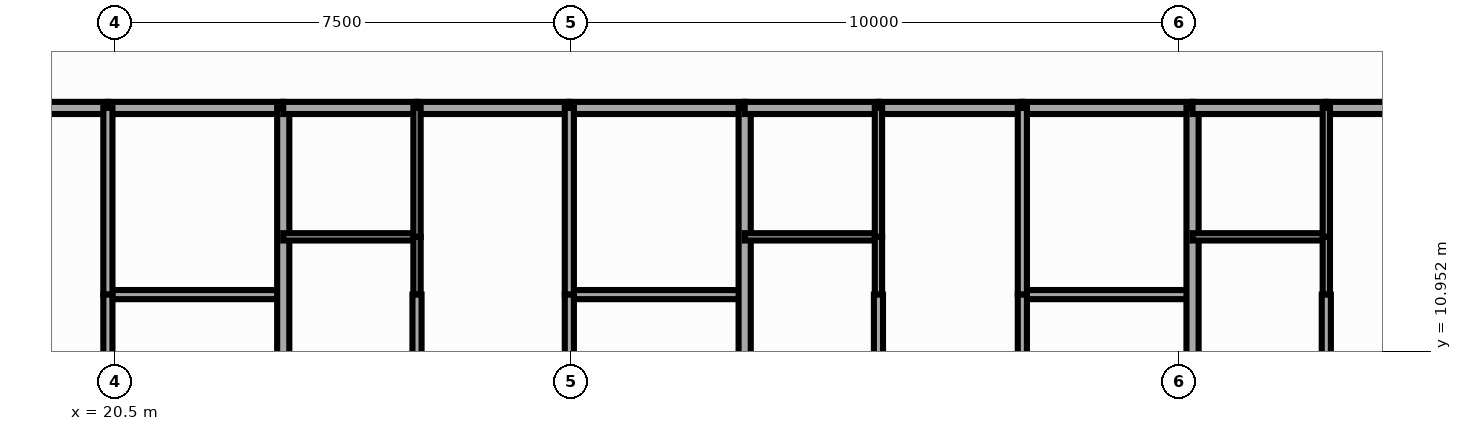
"""IFC4 building model, lengths in metres.
Left out: names, types, materials, properties, quantities, classifications, styles, units other than length and angle.
Written with IfcOpenShell. Run it as: python <this file> out.ifc"""

import sys

from ifc_helpers import new_model, si_unit, direction, frame, frame_2d, origin, place, context, subcontext, project, spatial, rectangle, extrude, source, transform, mapped, element, fill, save


model = new_model("IFC4")
c1 = context("Model", 3, precision=1e-05, world=origin(), true_north=direction((0.0, 1.0)))
c2 = subcontext(c1, "Body", "Model", "MODEL_VIEW")
j1 = project(units=[si_unit("LENGTHUNIT", "METRE"), si_unit("PLANEANGLEUNIT", "RADIAN")], contexts=[c1])
p1 = place(None, origin())
s1 = spatial("IfcSite", under=j1, at=p1, CompositionType="ELEMENT")
p2 = place(p1, origin())
s2 = spatial("IfcBuilding", under=s1, at=p2, CompositionType="ELEMENT")
p3 = place(p2, frame((0.0, 0.0, 19.4)))
s3 = spatial("IfcBuildingStorey", under=s2, at=p3, CompositionType="ELEMENT", Elevation=19.4)
p4 = place(p3, frame((17.88, 14.95, 0.0), z_axis=(0.0, 0.0, 1.0), x_axis=(1.0, 0.0, 0.0)))
e1 = element("IfcWall", 1, at=p4, inside=s3, PredefinedType="PARTITIONING", context=c2, shape_type="SweptSolid", body=[
    extrude(rectangle(XDim=2.505, YDim=0.2, at=frame_2d((1.252, 0.0))), origin(), (0.0, 0.0, 1.0), 2.79),
])
p5 = place(p4, frame((0.753, 0.0, 0.0)))
e2 = element("IfcOpeningElement", 2, at=p5, cuts=e1, PredefinedType="OPENING", context=c2, shape_type="SweptSolid", body=[
    extrude(rectangle(XDim=1.0, YDim=2.15, at=frame_2d((0.5, 1.075))), frame((0.0, 0.112, 0.0), z_axis=(0.0, -1.0, 0.0), x_axis=(1.0, 0.0, 0.0)), (0.0, 0.0, 1.0), 0.224),
])
p6 = place(p3, frame((20.385, 14.95, 0.0), z_axis=(0.0, 0.0, 1.0), x_axis=(1.0, 0.0, 0.0)))
e3 = element("IfcWall", 3, at=p6, inside=s3, PredefinedType="PARTITIONING", context=c2, shape_type="SweptSolid", body=[
    extrude(rectangle(XDim=2.884, YDim=0.2, at=frame_2d((1.442, 0.0))), origin(), (0.0, 0.0, 1.0), 2.79),
])
p7 = place(p3, frame((20.385, 11.88, 0.0), z_axis=(0.0, 0.0, 1.0), x_axis=(1.0, 0.0, 0.0)))
e4 = element("IfcWall", 4, at=p7, inside=s3, PredefinedType="PARTITIONING", context=c2, shape_type="SweptSolid", body=[
    extrude(rectangle(XDim=2.884, YDim=0.15, at=frame_2d((1.442, 0.0))), origin(), (0.0, 0.0, 1.0), 2.79),
])
p8 = place(p3, frame((20.385, 14.95, 0.0), z_axis=(0.0, 0.0, 1.0), x_axis=(0.0, -1.0, 0.0)))
e5 = element("IfcWall", 5, at=p8, inside=s3, PredefinedType="PARTITIONING", context=c2, shape_type="SweptSolid", body=[
    extrude(rectangle(XDim=3.07, YDim=0.15, at=frame_2d((1.535, 0.0))), origin(), (0.0, 0.0, 1.0), 2.79),
])
p9 = place(p8, frame((1.085, 0.0, 0.0)))
e6 = element("IfcOpeningElement", 6, at=p9, cuts=e5, PredefinedType="OPENING", context=c2, shape_type="SweptSolid", body=[
    extrude(rectangle(XDim=0.9, YDim=2.1, at=frame_2d((0.45, 1.05))), frame((0.0, 0.087, 0.0), z_axis=(0.0, -1.0, 0.0), x_axis=(1.0, 0.0, 0.0)), (0.0, 0.0, 1.0), 0.174),
])
p10 = place(p3, frame((20.385, 11.88, 0.0), z_axis=(0.0, 0.0, 1.0), x_axis=(0.0, -1.0, 0.0)))
e7 = element("IfcWall", 7, at=p10, inside=s3, PredefinedType="PARTITIONING", context=c2, shape_type="SweptSolid", body=[
    extrude(rectangle(XDim=8.73, YDim=0.15, at=frame_2d((4.365, 0.0))), origin(), (0.0, 0.0, 1.0), 2.79),
])
p11 = place(p10, frame((3.609, 0.0, 0.0)))
e8 = element("IfcOpeningElement", 8, at=p11, cuts=e7, PredefinedType="OPENING", context=c2, shape_type="SweptSolid", body=[
    extrude(rectangle(XDim=0.9, YDim=2.1, at=frame_2d((0.45, 1.05))), frame((0.0, 0.087, 0.0), z_axis=(0.0, -1.0, 0.0), x_axis=(1.0, 0.0, 0.0)), (0.0, 0.0, 1.0), 0.174),
])
p12 = place(p3, frame((23.269, 14.95, 0.0), z_axis=(0.0, 0.0, 1.0), x_axis=(0.0, -1.0, 0.0)))
e9 = element("IfcWall", 9, at=p12, inside=s3, PredefinedType="PARTITIONING", context=c2, shape_type="SweptSolid", body=[
    extrude(rectangle(XDim=11.8, YDim=0.2, at=frame_2d((5.9, 0.0))), origin(), (0.0, 0.0, 1.0), 2.79),
])
p13 = place(p3, frame((23.269, 14.95, 0.0), z_axis=(0.0, 0.0, 1.0), x_axis=(1.0, 0.0, 0.0)))
e10 = element("IfcWall", 10, at=p13, inside=s3, PredefinedType="PARTITIONING", context=c2, shape_type="SweptSolid", body=[
    extrude(rectangle(XDim=2.2, YDim=0.2, at=frame_2d((1.1, 0.0))), origin(), (0.0, 0.0, 1.0), 2.79),
])
p14 = place(p3, frame((25.469, 14.95, 0.0), z_axis=(0.0, 0.0, 1.0), x_axis=(1.0, 0.0, 0.0)))
e11 = element("IfcWall", 11, at=p14, inside=s3, PredefinedType="PARTITIONING", context=c2, shape_type="SweptSolid", body=[
    extrude(rectangle(XDim=2.505, YDim=0.2, at=frame_2d((1.252, 0.0))), origin(), (0.0, 0.0, 1.0), 2.79),
])
p15 = place(p14, frame((0.752, 0.0, 0.0)))
e12 = element("IfcOpeningElement", 12, at=p15, cuts=e11, PredefinedType="OPENING", context=c2, shape_type="SweptSolid", body=[
    extrude(rectangle(XDim=1.0, YDim=2.15, at=frame_2d((0.5, 1.075))), frame((0.0, 0.112, 0.0), z_axis=(0.0, -1.0, 0.0), x_axis=(1.0, 0.0, 0.0)), (0.0, 0.0, 1.0), 0.224),
])
p16 = place(p3, frame((27.974, 14.95, 0.0), z_axis=(0.0, 0.0, 1.0), x_axis=(1.0, 0.0, 0.0)))
e13 = element("IfcWall", 13, at=p16, inside=s3, PredefinedType="PARTITIONING", context=c2, shape_type="SweptSolid", body=[
    extrude(rectangle(XDim=2.884, YDim=0.2, at=frame_2d((1.442, 0.0))), origin(), (0.0, 0.0, 1.0), 2.79),
])
p17 = place(p3, frame((23.269, 12.83, 0.0), z_axis=(0.0, 0.0, 1.0), x_axis=(1.0, 0.0, 0.0)))
e14 = element("IfcWall", 14, at=p17, inside=s3, PredefinedType="PARTITIONING", context=c2, shape_type="SweptSolid", body=[
    extrude(rectangle(XDim=2.2, YDim=0.12, at=frame_2d((1.1, 0.0))), origin(), (0.0, 0.0, 1.0), 2.79),
])
p18 = place(p3, frame((27.974, 11.88, 0.0), z_axis=(0.0, 0.0, 1.0), x_axis=(1.0, 0.0, 0.0)))
e15 = element("IfcWall", 15, at=p18, inside=s3, PredefinedType="PARTITIONING", context=c2, shape_type="SweptSolid", body=[
    extrude(rectangle(XDim=2.884, YDim=0.15, at=frame_2d((1.442, 0.0))), origin(), (0.0, 0.0, 1.0), 2.79),
])
p19 = place(p3, frame((25.469, 14.95, 0.0), z_axis=(0.0, 0.0, 1.0), x_axis=(0.0, -1.0, 0.0)))
e16 = element("IfcWall", 16, at=p19, inside=s3, PredefinedType="PARTITIONING", context=c2, shape_type="SweptSolid", body=[
    extrude(rectangle(XDim=2.12, YDim=0.12, at=frame_2d((1.06, 0.0))), origin(), (0.0, 0.0, 1.0), 2.79),
])
p20 = place(p19, frame((0.635, 0.0, 0.0)))
e17 = element("IfcOpeningElement", 17, at=p20, cuts=e16, PredefinedType="OPENING", context=c2, shape_type="SweptSolid", body=[
    extrude(rectangle(XDim=0.85, YDim=2.05, at=frame_2d((0.425, 1.025))), frame((0.0, 0.072, 0.0), z_axis=(0.0, -1.0, 0.0), x_axis=(1.0, 0.0, 0.0)), (0.0, 0.0, 1.0), 0.144),
])
p21 = place(p3, frame((25.469, 12.83, 0.0), z_axis=(0.0, 0.0, 1.0), x_axis=(0.0, -1.0, 0.0)))
e18 = element("IfcWall", 18, at=p21, inside=s3, PredefinedType="PARTITIONING", context=c2, shape_type="SweptSolid", body=[
    extrude(rectangle(XDim=0.95, YDim=0.12, at=frame_2d((0.475, 0.0))), origin(), (0.0, 0.0, 1.0), 2.79),
])
p22 = place(p3, frame((25.469, 11.88, 0.0), z_axis=(0.0, 0.0, 1.0), x_axis=(0.0, -1.0, 0.0)))
e19 = element("IfcWall", 19, at=p22, inside=s3, PredefinedType="PARTITIONING", context=c2, shape_type="SweptSolid", body=[
    extrude(rectangle(XDim=8.73, YDim=0.15, at=frame_2d((4.365, 0.0))), origin(), (0.0, 0.0, 1.0), 2.79),
])
p23 = place(p22, frame((3.609, 0.0, 0.0)))
e20 = element("IfcOpeningElement", 20, at=p23, cuts=e19, PredefinedType="OPENING", context=c2, shape_type="SweptSolid", body=[
    extrude(rectangle(XDim=0.9, YDim=2.1, at=frame_2d((0.45, 1.05))), frame((0.0, 0.087, 0.0), z_axis=(0.0, -1.0, 0.0), x_axis=(1.0, 0.0, 0.0)), (0.0, 0.0, 1.0), 0.174),
])
p24 = place(p3, frame((27.974, 14.95, 0.0), z_axis=(0.0, 0.0, 1.0), x_axis=(0.0, -1.0, 0.0)))
e21 = element("IfcWall", 21, at=p24, inside=s3, PredefinedType="PARTITIONING", context=c2, shape_type="SweptSolid", body=[
    extrude(rectangle(XDim=3.07, YDim=0.15, at=frame_2d((1.535, 0.0))), origin(), (0.0, 0.0, 1.0), 2.79),
])
p25 = place(p24, frame((1.085, 0.0, 0.0)))
e22 = element("IfcOpeningElement", 22, at=p25, cuts=e21, PredefinedType="OPENING", context=c2, shape_type="SweptSolid", body=[
    extrude(rectangle(XDim=0.9, YDim=2.1, at=frame_2d((0.45, 1.05))), frame((0.0, 0.087, 0.0), z_axis=(0.0, -1.0, 0.0), x_axis=(1.0, 0.0, 0.0)), (0.0, 0.0, 1.0), 0.174),
])
p26 = place(p3, frame((27.974, 11.88, 0.0), z_axis=(0.0, 0.0, 1.0), x_axis=(0.0, -1.0, 0.0)))
e23 = element("IfcWall", 23, at=p26, inside=s3, PredefinedType="PARTITIONING", context=c2, shape_type="SweptSolid", body=[
    extrude(rectangle(XDim=8.73, YDim=0.15, at=frame_2d((4.365, 0.0))), origin(), (0.0, 0.0, 1.0), 2.79),
])
p27 = place(p26, frame((3.609, 0.0, 0.0)))
e24 = element("IfcOpeningElement", 24, at=p27, cuts=e23, PredefinedType="OPENING", context=c2, shape_type="SweptSolid", body=[
    extrude(rectangle(XDim=0.9, YDim=2.1, at=frame_2d((0.45, 1.05))), frame((0.0, 0.087, 0.0), z_axis=(0.0, -1.0, 0.0), x_axis=(1.0, 0.0, 0.0)), (0.0, 0.0, 1.0), 0.174),
])
p28 = place(p3, frame((30.858, 14.95, 0.0), z_axis=(0.0, 0.0, 1.0), x_axis=(0.0, -1.0, 0.0)))
e25 = element("IfcWall", 25, at=p28, inside=s3, PredefinedType="PARTITIONING", context=c2, shape_type="SweptSolid", body=[
    extrude(rectangle(XDim=11.8, YDim=0.2, at=frame_2d((5.9, 0.0))), origin(), (0.0, 0.0, 1.0), 2.24),
])
p29 = place(p3, frame((30.858, 14.95, 0.0), z_axis=(0.0, 0.0, 1.0), x_axis=(1.0, 0.0, 0.0)))
e26 = element("IfcWall", 26, at=p29, inside=s3, PredefinedType="PARTITIONING", context=c2, shape_type="SweptSolid", body=[
    extrude(rectangle(XDim=2.2, YDim=0.2, at=frame_2d((1.1, 0.0))), origin(), (0.0, 0.0, 1.0), 2.79),
])
p30 = place(p3, frame((33.058, 14.95, 0.0), z_axis=(0.0, 0.0, 1.0), x_axis=(1.0, 0.0, 0.0)))
e27 = element("IfcWall", 27, at=p30, inside=s3, PredefinedType="PARTITIONING", context=c2, shape_type="SweptSolid", body=[
    extrude(rectangle(XDim=2.367, YDim=0.2, at=frame_2d((1.183, 0.0))), origin(), (0.0, 0.0, 1.0), 2.79),
])
p31 = place(p30, frame((0.683, 0.0, 0.0)))
e28 = element("IfcOpeningElement", 28, at=p31, cuts=e27, PredefinedType="OPENING", context=c2, shape_type="SweptSolid", body=[
    extrude(rectangle(XDim=1.0, YDim=2.15, at=frame_2d((0.5, 1.075))), frame((0.0, 0.112, 0.0), z_axis=(0.0, -1.0, 0.0), x_axis=(1.0, 0.0, 0.0)), (0.0, 0.0, 1.0), 0.224),
])
p32 = place(p3, frame((35.424, 14.95, 0.0), z_axis=(0.0, 0.0, 1.0), x_axis=(1.0, 0.0, 0.0)))
e29 = element("IfcWall", 29, at=p32, inside=s3, PredefinedType="PARTITIONING", context=c2, shape_type="SweptSolid", body=[
    extrude(rectangle(XDim=2.799, YDim=0.2, at=frame_2d((1.399, 0.0))), origin(), (0.0, 0.0, 1.0), 2.79),
])
p33 = place(p3, frame((30.858, 12.83, 0.0), z_axis=(0.0, 0.0, 1.0), x_axis=(1.0, 0.0, 0.0)))
e30 = element("IfcWall", 30, at=p33, inside=s3, PredefinedType="PARTITIONING", context=c2, shape_type="SweptSolid", body=[
    extrude(rectangle(XDim=2.2, YDim=0.12, at=frame_2d((1.1, 0.0))), origin(), (0.0, 0.0, 1.0), 2.79),
])
p34 = place(p3, frame((35.424, 11.88, 0.0), z_axis=(0.0, 0.0, 1.0), x_axis=(1.0, 0.0, 0.0)))
e31 = element("IfcWall", 31, at=p34, inside=s3, PredefinedType="PARTITIONING", context=c2, shape_type="SweptSolid", body=[
    extrude(rectangle(XDim=2.799, YDim=0.15, at=frame_2d((1.399, 0.0))), origin(), (0.0, 0.0, 1.0), 2.79),
])
p35 = place(p3, frame((33.058, 14.95, 0.0), z_axis=(0.0, 0.0, 1.0), x_axis=(0.0, -1.0, 0.0)))
e32 = element("IfcWall", 32, at=p35, inside=s3, PredefinedType="PARTITIONING", context=c2, shape_type="SweptSolid", body=[
    extrude(rectangle(XDim=2.12, YDim=0.12, at=frame_2d((1.06, 0.0))), origin(), (0.0, 0.0, 1.0), 2.79),
])
p36 = place(p35, frame((0.635, 0.0, 0.0)))
e33 = element("IfcOpeningElement", 33, at=p36, cuts=e32, PredefinedType="OPENING", context=c2, shape_type="SweptSolid", body=[
    extrude(rectangle(XDim=0.85, YDim=2.05, at=frame_2d((0.425, 1.025))), frame((0.0, 0.072, 0.0), z_axis=(0.0, -1.0, 0.0), x_axis=(1.0, 0.0, 0.0)), (0.0, 0.0, 1.0), 0.144),
])
p37 = place(p3, frame((33.058, 12.83, 0.0), z_axis=(0.0, 0.0, 1.0), x_axis=(0.0, -1.0, 0.0)))
e34 = element("IfcWall", 34, at=p37, inside=s3, PredefinedType="PARTITIONING", context=c2, shape_type="SweptSolid", body=[
    extrude(rectangle(XDim=0.95, YDim=0.12, at=frame_2d((0.475, 0.0))), origin(), (0.0, 0.0, 1.0), 2.79),
])
p38 = place(p3, frame((33.058, 11.88, 0.0), z_axis=(0.0, 0.0, 1.0), x_axis=(0.0, -1.0, 0.0)))
e35 = element("IfcWall", 35, at=p38, inside=s3, PredefinedType="PARTITIONING", context=c2, shape_type="SweptSolid", body=[
    extrude(rectangle(XDim=8.73, YDim=0.15, at=frame_2d((4.365, 0.0))), origin(), (0.0, 0.0, 1.0), 2.79),
])
p39 = place(p38, frame((3.609, 0.0, 0.0)))
e36 = element("IfcOpeningElement", 36, at=p39, cuts=e35, PredefinedType="OPENING", context=c2, shape_type="SweptSolid", body=[
    extrude(rectangle(XDim=0.9, YDim=2.1, at=frame_2d((0.45, 1.05))), frame((0.0, 0.087, 0.0), z_axis=(0.0, -1.0, 0.0), x_axis=(1.0, 0.0, 0.0)), (0.0, 0.0, 1.0), 0.174),
])
p40 = place(p3, frame((35.424, 14.95, 0.0), z_axis=(0.0, 0.0, 1.0), x_axis=(0.0, -1.0, 0.0)))
e37 = element("IfcWall", 37, at=p40, inside=s3, PredefinedType="PARTITIONING", context=c2, shape_type="SweptSolid", body=[
    extrude(rectangle(XDim=3.07, YDim=0.15, at=frame_2d((1.535, 0.0))), origin(), (0.0, 0.0, 1.0), 2.79),
])
p41 = place(p40, frame((1.085, 0.0, 0.0)))
e38 = element("IfcOpeningElement", 38, at=p41, cuts=e37, PredefinedType="OPENING", context=c2, shape_type="SweptSolid", body=[
    extrude(rectangle(XDim=0.9, YDim=2.1, at=frame_2d((0.45, 1.05))), frame((0.0, 0.087, 0.0), z_axis=(0.0, -1.0, 0.0), x_axis=(1.0, 0.0, 0.0)), (0.0, 0.0, 1.0), 0.174),
])
p42 = place(p3, frame((35.424, 11.88, 0.0), z_axis=(0.0, 0.0, 1.0), x_axis=(0.0, -1.0, 0.0)))
e39 = element("IfcWall", 39, at=p42, inside=s3, PredefinedType="PARTITIONING", context=c2, shape_type="SweptSolid", body=[
    extrude(rectangle(XDim=8.73, YDim=0.15, at=frame_2d((4.365, 0.0))), origin(), (0.0, 0.0, 1.0), 2.79),
])
p43 = place(p42, frame((3.609, 0.0, 0.0)))
e40 = element("IfcOpeningElement", 40, at=p43, cuts=e39, PredefinedType="OPENING", context=c2, shape_type="SweptSolid", body=[
    extrude(rectangle(XDim=0.9, YDim=2.1, at=frame_2d((0.45, 1.05))), frame((0.0, 0.087, 0.0), z_axis=(0.0, -1.0, 0.0), x_axis=(1.0, 0.0, 0.0)), (0.0, 0.0, 1.0), 0.174),
])
p44 = place(p3, frame((38.223, 14.95, 0.0), z_axis=(0.0, 0.0, 1.0), x_axis=(0.0, -1.0, 0.0)))
e41 = element("IfcWall", 41, at=p44, inside=s3, PredefinedType="PARTITIONING", context=c2, shape_type="SweptSolid", body=[
    extrude(rectangle(XDim=11.8, YDim=0.2, at=frame_2d((5.9, 0.0))), origin(), (0.0, 0.0, 1.0), 2.79),
])
p45 = place(p3, frame((38.223, 14.95, 0.0), z_axis=(0.0, 0.0, 1.0), x_axis=(1.0, 0.0, 0.0)))
e42 = element("IfcWall", 42, at=p45, inside=s3, PredefinedType="PARTITIONING", context=c2, shape_type="SweptSolid", body=[
    extrude(rectangle(XDim=2.2, YDim=0.2, at=frame_2d((1.1, 0.0))), origin(), (0.0, 0.0, 1.0), 2.79),
])
p46 = place(p3, frame((40.423, 14.95, 0.0), z_axis=(0.0, 0.0, 1.0), x_axis=(1.0, 0.0, 0.0)))
e43 = element("IfcWall", 43, at=p46, inside=s3, PredefinedType="PARTITIONING", context=c2, shape_type="SweptSolid", body=[
    extrude(rectangle(XDim=2.367, YDim=0.2, at=frame_2d((1.183, 0.0))), origin(), (0.0, 0.0, 1.0), 2.79),
])
p47 = place(p46, frame((0.683, 0.0, 0.0)))
e44 = element("IfcOpeningElement", 44, at=p47, cuts=e43, PredefinedType="OPENING", context=c2, shape_type="SweptSolid", body=[
    extrude(rectangle(XDim=1.0, YDim=2.15, at=frame_2d((0.5, 1.075))), frame((0.0, 0.112, 0.0), z_axis=(0.0, -1.0, 0.0), x_axis=(1.0, 0.0, 0.0)), (0.0, 0.0, 1.0), 0.224),
])
p48 = place(p3, frame((38.223, 12.83, 0.0), z_axis=(0.0, 0.0, 1.0), x_axis=(1.0, 0.0, 0.0)))
e45 = element("IfcWall", 45, at=p48, inside=s3, PredefinedType="PARTITIONING", context=c2, shape_type="SweptSolid", body=[
    extrude(rectangle(XDim=2.2, YDim=0.12, at=frame_2d((1.1, 0.0))), origin(), (0.0, 0.0, 1.0), 2.79),
])
p49 = place(p3, frame((40.423, 14.95, 0.0), z_axis=(0.0, 0.0, 1.0), x_axis=(0.0, -1.0, 0.0)))
e46 = element("IfcWall", 46, at=p49, inside=s3, PredefinedType="PARTITIONING", context=c2, shape_type="SweptSolid", body=[
    extrude(rectangle(XDim=2.12, YDim=0.12, at=frame_2d((1.06, 0.0))), origin(), (0.0, 0.0, 1.0), 2.79),
])
p50 = place(p49, frame((0.635, 0.0, 0.0)))
e47 = element("IfcOpeningElement", 47, at=p50, cuts=e46, PredefinedType="OPENING", context=c2, shape_type="SweptSolid", body=[
    extrude(rectangle(XDim=0.85, YDim=2.05, at=frame_2d((0.425, 1.025))), frame((0.0, 0.072, 0.0), z_axis=(0.0, -1.0, 0.0), x_axis=(1.0, 0.0, 0.0)), (0.0, 0.0, 1.0), 0.144),
])
p51 = place(p3, frame((40.423, 12.83, 0.0), z_axis=(0.0, 0.0, 1.0), x_axis=(0.0, -1.0, 0.0)))
e48 = element("IfcWall", 48, at=p51, inside=s3, PredefinedType="PARTITIONING", context=c2, shape_type="SweptSolid", body=[
    extrude(rectangle(XDim=0.95, YDim=0.12, at=frame_2d((0.475, 0.0))), origin(), (0.0, 0.0, 1.0), 2.79),
])
p52 = place(p3, frame((40.423, 11.88, 0.0), z_axis=(0.0, 0.0, 1.0), x_axis=(0.0, -1.0, 0.0)))
e49 = element("IfcWall", 49, at=p52, inside=s3, PredefinedType="PARTITIONING", context=c2, shape_type="SweptSolid", body=[
    extrude(rectangle(XDim=8.73, YDim=0.15, at=frame_2d((4.365, 0.0))), origin(), (0.0, 0.0, 1.0), 2.79),
])
p53 = place(p52, frame((3.609, 0.0, 0.0)))
e50 = element("IfcOpeningElement", 50, at=p53, cuts=e49, PredefinedType="OPENING", context=c2, shape_type="SweptSolid", body=[
    extrude(rectangle(XDim=0.9, YDim=2.1, at=frame_2d((0.45, 1.05))), frame((0.0, 0.087, 0.0), z_axis=(0.0, -1.0, 0.0), x_axis=(1.0, 0.0, 0.0)), (0.0, 0.0, 1.0), 0.174),
])
m1 = source(origin(), c2, "Body", "SweptSolid", [
    extrude(rectangle(XDim=1.0, YDim=2.15, at=frame_2d((0.5, 1.075))), frame((0.0, 0.025, 0.0), z_axis=(0.0, -1.0, 0.0), x_axis=(1.0, 0.0, 0.0)), (0.0, 0.0, 1.0), 0.05),
])
p54 = place(p5, origin())
e51 = element("IfcDoor", 51, at=p54, inside=s3, OperationType="SINGLE_SWING_LEFT", PredefinedType="DOOR", context=c2, shape_type="MappedRepresentation", body=[
    mapped(m1, transform((0.0, 0.0, 0.0), scale=1.0)),
])
fill(e2, e51)
m2 = source(origin(), c2, "Body", "SweptSolid", [
    extrude(rectangle(XDim=0.9, YDim=2.1, at=frame_2d((0.45, 1.05))), frame((0.0, 0.025, 0.0), z_axis=(0.0, -1.0, 0.0), x_axis=(1.0, 0.0, 0.0)), (0.0, 0.0, 1.0), 0.05),
])
p55 = place(p9, origin())
e52 = element("IfcDoor", 52, at=p55, inside=s3, OperationType="SINGLE_SWING_RIGHT", PredefinedType="DOOR", context=c2, shape_type="MappedRepresentation", body=[
    mapped(m2, transform((0.0, 0.0, 0.0), scale=1.0)),
])
fill(e6, e52)
p56 = place(p15, origin())
e53 = element("IfcDoor", 53, at=p56, inside=s3, OperationType="SINGLE_SWING_RIGHT", PredefinedType="DOOR", context=c2, shape_type="MappedRepresentation", body=[
    mapped(m1, transform((0.0, 0.0, 0.0), scale=1.0)),
])
fill(e12, e53)
m3 = source(origin(), c2, "Body", "SweptSolid", [
    extrude(rectangle(XDim=0.85, YDim=2.05, at=frame_2d((0.425, 1.025))), frame((0.0, 0.025, 0.0), z_axis=(0.0, -1.0, 0.0), x_axis=(1.0, 0.0, 0.0)), (0.0, 0.0, 1.0), 0.05),
])
p57 = place(p20, origin())
e54 = element("IfcDoor", 54, at=p57, inside=s3, OperationType="SINGLE_SWING_LEFT", PredefinedType="DOOR", context=c2, shape_type="MappedRepresentation", body=[
    mapped(m3, transform((0.0, 0.0, 0.0), scale=1.0)),
])
fill(e17, e54)
p58 = place(p25, origin())
e55 = element("IfcDoor", 55, at=p58, inside=s3, OperationType="SINGLE_SWING_LEFT", PredefinedType="DOOR", context=c2, shape_type="MappedRepresentation", body=[
    mapped(m2, transform((0.0, 0.0, 0.0), scale=1.0)),
])
fill(e22, e55)
p59 = place(p31, origin())
e56 = element("IfcDoor", 56, at=p59, inside=s3, OperationType="SINGLE_SWING_LEFT", PredefinedType="DOOR", context=c2, shape_type="MappedRepresentation", body=[
    mapped(m1, transform((0.0, 0.0, 0.0), scale=1.0)),
])
fill(e28, e56)
p60 = place(p36, origin())
e57 = element("IfcDoor", 57, at=p60, inside=s3, OperationType="SINGLE_SWING_RIGHT", PredefinedType="DOOR", context=c2, shape_type="MappedRepresentation", body=[
    mapped(m3, transform((0.0, 0.0, 0.0), scale=1.0)),
])
fill(e33, e57)
p61 = place(p41, origin())
e58 = element("IfcDoor", 58, at=p61, inside=s3, OperationType="SINGLE_SWING_RIGHT", PredefinedType="DOOR", context=c2, shape_type="MappedRepresentation", body=[
    mapped(m2, transform((0.0, 0.0, 0.0), scale=1.0)),
])
fill(e38, e58)
p62 = place(p47, origin())
e59 = element("IfcDoor", 59, at=p62, inside=s3, OperationType="SINGLE_SWING_RIGHT", PredefinedType="DOOR", context=c2, shape_type="MappedRepresentation", body=[
    mapped(m1, transform((0.0, 0.0, 0.0), scale=1.0)),
])
fill(e44, e59)
p63 = place(p50, origin())
e60 = element("IfcDoor", 60, at=p63, inside=s3, OperationType="SINGLE_SWING_LEFT", PredefinedType="DOOR", context=c2, shape_type="MappedRepresentation", body=[
    mapped(m3, transform((0.0, 0.0, 0.0), scale=1.0)),
])
fill(e47, e60)
save(model, sys.argv[1])
